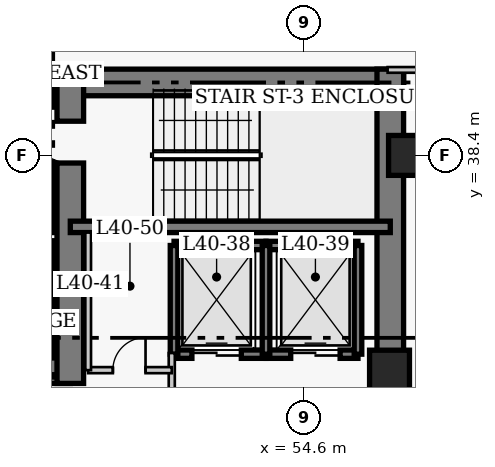
"""IFC4 building model, lengths in metres.
Left out: names, types, materials, properties, quantities, classifications, styles, units other than length and angle.
Written with IfcOpenShell. Run it as: python <this file> out.ifc"""

import sys

from ifc_helpers import new_model, si_unit, direction, frame, frame_2d, origin, origin_2d, place, context, subcontext, project, spatial, rectangle, extrude, element, fill, save


model = new_model("IFC4")
c1 = context("Model", 3, precision=1e-05, world=origin(), true_north=direction((0.0, 1.0)))
c2 = subcontext(c1, "Body", "Model", "MODEL_VIEW")
j1 = project(units=[si_unit("LENGTHUNIT", "METRE"), si_unit("PLANEANGLEUNIT", "RADIAN")], contexts=[c1])
p1 = place(None, origin())
s1 = spatial("IfcSite", under=j1, at=p1, CompositionType="ELEMENT")
p2 = place(p1, origin())
s2 = spatial("IfcBuilding", under=s1, at=p2, CompositionType="ELEMENT")
p3 = place(p2, frame((0.0, 0.0, 161.2)))
s3 = spatial("IfcBuildingStorey", under=s2, at=p3, CompositionType="ELEMENT", Elevation=161.2)
p4 = place(p3, frame((35.85, 40.32, 0.0), z_axis=(0.0, 0.0, 1.0), x_axis=(1.0, 0.0, 0.0)))
e1 = element("IfcWall", 1, at=p4, inside=s3, PredefinedType="SHEAR", context=c2, shape_type="SweptSolid", body=[
    extrude(rectangle(XDim=12.6, YDim=0.7, at=frame_2d((6.3, 0.0))), origin(), (0.0, 0.0, 1.0), 3.8),
])
p5 = place(p3, frame((48.45, 40.32, 0.0), z_axis=(0.0, 0.0, 1.0), x_axis=(1.0, 0.0, 0.0)))
e2 = element("IfcWall", 2, at=p5, inside=s3, PredefinedType="SHEAR", context=c2, shape_type="SweptSolid", body=[
    extrude(rectangle(XDim=8.77, YDim=0.7, at=frame_2d((4.385, 0.0))), origin(), (0.0, 0.0, 1.0), 3.8),
])
p6 = place(p3, frame((56.87, 27.05, 0.0), z_axis=(0.0, 0.0, 1.0), x_axis=(0.0, 1.0, 0.0)))
e3 = element("IfcWall", 3, at=p6, inside=s3, PredefinedType="SHEAR", context=c2, shape_type="SweptSolid", body=[
    extrude(rectangle(XDim=13.62, YDim=0.7, at=frame_2d((6.81, 0.0))), origin(), (0.0, 0.0, 1.0), 3.8),
])
p7 = place(p3, frame((45.81, 32.75, 0.0), z_axis=(0.0, 0.0, 1.0), x_axis=(1.0, 0.0, 0.0)))
e4 = element("IfcWall", 4, at=p7, inside=s3, PredefinedType="SHEAR", context=c2, shape_type="SweptSolid", body=[
    extrude(rectangle(XDim=2.64, YDim=0.7, at=frame_2d((1.32, 0.0))), origin(), (0.0, 0.0, 1.0), 3.8),
])
p8 = place(p3, frame((48.45, 32.4, 0.0), z_axis=(0.0, 0.0, 1.0), x_axis=(0.0, 1.0, 0.0)))
e5 = element("IfcWall", 5, at=p8, inside=s3, PredefinedType="SHEAR", context=c2, shape_type="SweptSolid", body=[
    extrude(rectangle(XDim=7.92, YDim=0.7, at=frame_2d((3.96, 0.0))), origin(), (0.0, 0.0, 1.0), 3.8),
])
p9 = place(p8, frame((5.8, 0.0, 0.0)))
e6 = element("IfcOpeningElement", 6, at=p9, cuts=e5, PredefinedType="OPENING", context=c2, shape_type="SweptSolid", body=[
    extrude(rectangle(XDim=1.1, YDim=2.15, at=frame_2d((0.55, 1.075))), frame((0.0, 0.36, 0.0), z_axis=(0.0, -1.0, 0.0), x_axis=(1.0, 0.0, 0.0)), (0.0, 0.0, 1.0), 0.72),
])
p10 = place(p3, frame((48.45, 36.52, 0.0), z_axis=(0.0, 0.0, 1.0), x_axis=(1.0, 0.0, 0.0)))
e7 = element("IfcWall", 7, at=p10, inside=s3, PredefinedType="SHEAR", context=c2, shape_type="SweptSolid", body=[
    extrude(rectangle(XDim=8.42, YDim=0.3, at=frame_2d((4.21, 0.0))), origin(), (0.0, 0.0, 1.0), 3.8),
])
for number, where, z_axis, x_axis in (
    (8, (57.35, 38.4, 0.0), (0.0, 0.0, 1.0), (1.0, 0.0, 0.0)),
    (9, (56.85, 32.75, 0.0), (0.0, 0.0, 1.0), (1.0, 0.0, 0.0)),
):
    element("IfcColumn", number, at=place(p3, frame(where, z_axis=z_axis, x_axis=x_axis)), inside=s3, PredefinedType="COLUMN", context=c2, shape_type="SweptSolid", body=[
        extrude(rectangle(XDim=1.05, YDim=1.05, at=origin_2d()), origin(), (0.0, 0.0, 1.0), 3.8),
    ])
p11 = place(p3, frame((51.18, 36.03, 0.0), z_axis=(0.0, 0.0, 1.0), x_axis=(1.0, 0.0, 0.0)))
e10 = element("IfcWall", 10, at=p11, inside=s3, PredefinedType="SHEAR", context=c2, shape_type="SweptSolid", body=[
    extrude(rectangle(XDim=2.42, YDim=0.22, at=frame_2d((1.21, 0.0))), origin(), (0.0, 0.0, 1.0), 3.8),
])
p12 = place(p3, frame((51.18, 33.17, 0.0), z_axis=(0.0, 0.0, 1.0), x_axis=(1.0, 0.0, 0.0)))
e11 = element("IfcWall", 11, at=p12, inside=s3, PredefinedType="SHEAR", context=c2, shape_type="SweptSolid", body=[
    extrude(rectangle(XDim=2.42, YDim=0.22, at=frame_2d((1.21, 0.0))), origin(), (0.0, 0.0, 1.0), 3.8),
])
p13 = place(p12, frame((0.47, 0.0, 0.0)))
e12 = element("IfcOpeningElement", 12, at=p13, cuts=e11, PredefinedType="OPENING", context=c2, shape_type="SweptSolid", body=[
    extrude(rectangle(XDim=1.3, YDim=2.15, at=frame_2d((0.65, 1.075))), frame((0.0, 0.12, 0.0), z_axis=(0.0, -1.0, 0.0), x_axis=(1.0, 0.0, 0.0)), (0.0, 0.0, 1.0), 0.24),
])
p14 = place(p3, frame((51.18, 33.17, 0.0), z_axis=(0.0, 0.0, 1.0), x_axis=(0.0, 1.0, 0.0)))
e13 = element("IfcWall", 13, at=p14, inside=s3, PredefinedType="SHEAR", context=c2, shape_type="SweptSolid", body=[
    extrude(rectangle(XDim=2.86, YDim=0.2, at=frame_2d((1.43, 0.0))), origin(), (0.0, 0.0, 1.0), 3.8),
])
p15 = place(p3, frame((53.6, 36.03, 0.0), z_axis=(0.0, 0.0, 1.0), x_axis=(1.0, 0.0, 0.0)))
e14 = element("IfcWall", 14, at=p15, inside=s3, PredefinedType="SHEAR", context=c2, shape_type="SweptSolid", body=[
    extrude(rectangle(XDim=2.42, YDim=0.22, at=frame_2d((1.21, 0.0))), origin(), (0.0, 0.0, 1.0), 3.8),
])
p16 = place(p3, frame((53.6, 33.17, 0.0), z_axis=(0.0, 0.0, 1.0), x_axis=(1.0, 0.0, 0.0)))
e15 = element("IfcWall", 15, at=p16, inside=s3, PredefinedType="SHEAR", context=c2, shape_type="SweptSolid", body=[
    extrude(rectangle(XDim=2.42, YDim=0.22, at=frame_2d((1.21, 0.0))), origin(), (0.0, 0.0, 1.0), 3.8),
])
p17 = place(p16, frame((0.65, 0.0, 0.0)))
e16 = element("IfcOpeningElement", 16, at=p17, cuts=e15, PredefinedType="OPENING", context=c2, shape_type="SweptSolid", body=[
    extrude(rectangle(XDim=1.3, YDim=2.15, at=frame_2d((0.65, 1.075))), frame((0.0, 0.12, 0.0), z_axis=(0.0, -1.0, 0.0), x_axis=(1.0, 0.0, 0.0)), (0.0, 0.0, 1.0), 0.24),
])
for number, where, z_axis, x_axis in (
    (17, (53.6, 33.17, 0.0), (0.0, 0.0, 1.0), (0.0, 1.0, 0.0)),
    (18, (56.02, 33.17, 0.0), (0.0, 0.0, 1.0), (0.0, 1.0, 0.0)),
):
    element("IfcWall", number, at=place(p3, frame(where, z_axis=z_axis, x_axis=x_axis)), inside=s3, PredefinedType="SHEAR", context=c2, shape_type="SweptSolid", body=[
        extrude(rectangle(XDim=2.86, YDim=0.2, at=frame_2d((1.43, 0.0))), origin(), (0.0, 0.0, 1.0), 3.8),
    ])
p18 = place(p3, frame((47.895, 33.245, 0.0), z_axis=(0.0, 0.0, 1.0), x_axis=(0.0, 1.0, 0.0)))
e19 = element("IfcWall", 19, at=p18, inside=s3, PredefinedType="SHEAR", context=c2, shape_type="SweptSolid", body=[
    extrude(rectangle(XDim=2.91, YDim=0.2, at=frame_2d((1.455, 0.0))), origin(), (0.0, 0.0, 1.0), 3.8),
])
p19 = place(p3, frame((51.12, 29.5, 0.0), z_axis=(0.0, 0.0, 1.0), x_axis=(0.0, 1.0, 0.0)))
e20 = element("IfcWall", 20, at=p19, inside=s3, PredefinedType="PARTITIONING", context=c2, shape_type="SweptSolid", body=[
    extrude(rectangle(XDim=3.7, YDim=0.16, at=frame_2d((1.85, 0.0))), origin(), (0.0, 0.0, 1.0), 3.55),
])
p20 = place(p19, frame((0.9, 0.0, 0.0)))
e21 = element("IfcOpeningElement", 21, at=p20, cuts=e20, PredefinedType="OPENING", context=c2, shape_type="SweptSolid", body=[
    extrude(rectangle(XDim=1.1, YDim=2.15, at=frame_2d((0.55, 1.075))), frame((0.0, 0.09, 0.0), z_axis=(0.0, -1.0, 0.0), x_axis=(1.0, 0.0, 0.0)), (0.0, 0.0, 1.0), 0.18),
])
p21 = place(p3, frame((48.92, 32.75, 0.0), z_axis=(0.0, 0.0, 1.0), x_axis=(1.0, 0.0, 0.0)))
e22 = element("IfcWall", 22, at=p21, inside=s3, PredefinedType="PARTITIONING", context=c2, shape_type="SweptSolid", body=[
    extrude(rectangle(XDim=2.2, YDim=0.16, at=frame_2d((1.1, 0.0))), origin(), (0.0, 0.0, 1.0), 3.55),
])
p22 = place(p21, frame((0.65, 0.0, 0.0)))
e23 = element("IfcOpeningElement", 23, at=p22, cuts=e22, PredefinedType="OPENING", context=c2, shape_type="SweptSolid", body=[
    extrude(rectangle(XDim=0.86, YDim=2.05, at=frame_2d((0.43, 1.025))), frame((0.0, 0.09, 0.0), z_axis=(0.0, -1.0, 0.0), x_axis=(1.0, 0.0, 0.0)), (0.0, 0.0, 1.0), 0.18),
])
p23 = place(p3, frame((48.92, 32.75, 0.0), z_axis=(0.0, 0.0, 1.0), x_axis=(0.0, 1.0, 0.0)))
e24 = element("IfcWall", 24, at=p23, inside=s3, PredefinedType="PARTITIONING", context=c2, shape_type="SweptSolid", body=[
    extrude(rectangle(XDim=3.62, YDim=0.15, at=frame_2d((1.81, 0.0))), origin(), (0.0, 0.0, 1.0), 3.55),
])
p24 = place(p3, frame((56.8, 40.65, 0.0), z_axis=(0.0, 0.0, 1.0), x_axis=(1.0, 0.0, 0.0)))
e25 = element("IfcWall", 25, at=p24, inside=s3, PredefinedType="PARTITIONING", context=c2, shape_type="SweptSolid", body=[
    extrude(rectangle(XDim=3.81, YDim=0.15, at=frame_2d((1.905, 0.0))), origin(), (0.0, 0.0, 1.0), 3.55),
])
p25 = place(p24, frame((2.2, 0.0, 0.0)))
e26 = element("IfcOpeningElement", 26, at=p25, cuts=e25, PredefinedType="OPENING", context=c2, shape_type="SweptSolid", body=[
    extrude(rectangle(XDim=1.0, YDim=2.15, at=frame_2d((0.5, 1.075))), frame((0.0, 0.085, 0.0), z_axis=(0.0, -1.0, 0.0), x_axis=(1.0, 0.0, 0.0)), (0.0, 0.0, 1.0), 0.17),
])
p26 = place(p13, origin())
e27 = element("IfcDoor", 27, at=p26, inside=s3, OperationType="DOUBLE_DOOR_SLIDING", PredefinedType="DOOR", context=c2, shape_type="SweptSolid", body=[
    extrude(rectangle(XDim=1.3, YDim=2.15, at=frame_2d((0.65, 1.075))), frame((0.0, 0.025, 0.0), z_axis=(0.0, -1.0, 0.0), x_axis=(1.0, 0.0, 0.0)), (0.0, 0.0, 1.0), 0.05),
])
fill(e12, e27)
p27 = place(p17, origin())
e28 = element("IfcDoor", 28, at=p27, inside=s3, OperationType="DOUBLE_DOOR_SLIDING", PredefinedType="DOOR", context=c2, shape_type="SweptSolid", body=[
    extrude(rectangle(XDim=1.3, YDim=2.15, at=frame_2d((0.65, 1.075))), frame((0.0, 0.025, 0.0), z_axis=(0.0, -1.0, 0.0), x_axis=(1.0, 0.0, 0.0)), (0.0, 0.0, 1.0), 0.05),
])
fill(e16, e28)
p28 = place(p22, origin())
e29 = element("IfcDoor", 29, at=p28, inside=s3, OperationType="SINGLE_SWING_RIGHT", PredefinedType="DOOR", context=c2, shape_type="SweptSolid", body=[
    extrude(rectangle(XDim=0.86, YDim=2.05, at=frame_2d((0.43, 1.025))), frame((0.0, 0.025, 0.0), z_axis=(0.0, -1.0, 0.0), x_axis=(1.0, 0.0, 0.0)), (0.0, 0.0, 1.0), 0.05),
])
fill(e23, e29)
p29 = place(p9, origin())
e30 = element("IfcDoor", 30, at=p29, inside=s3, OperationType="SINGLE_SWING_RIGHT", PredefinedType="DOOR", context=c2, shape_type="SweptSolid", body=[
    extrude(rectangle(XDim=1.1, YDim=2.15, at=frame_2d((0.55, 1.075))), frame((0.0, 0.025, 0.0), z_axis=(0.0, -1.0, 0.0), x_axis=(1.0, 0.0, 0.0)), (0.0, 0.0, 1.0), 0.05),
])
fill(e6, e30)
save(model, sys.argv[1])
